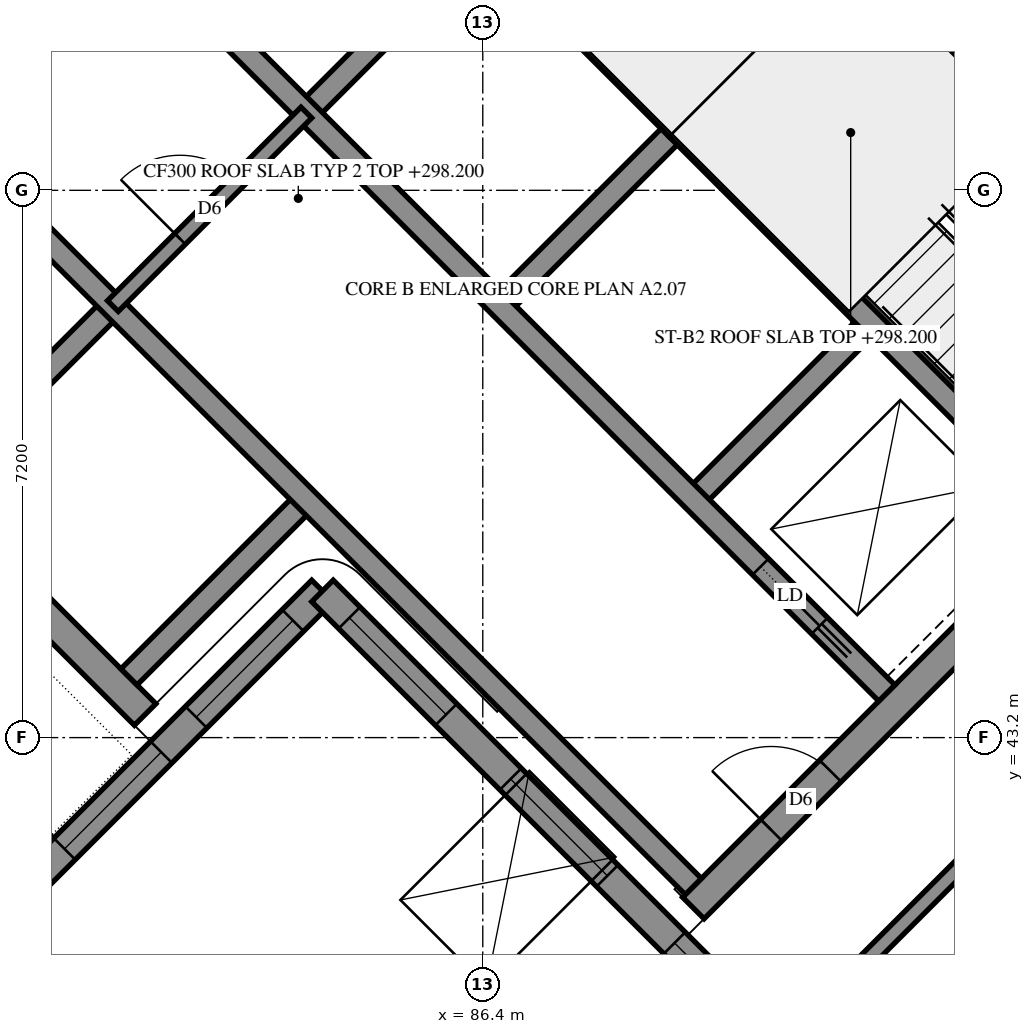
"""IFC4 building model, lengths in metres.
Left out: names, types, materials, properties, quantities, classifications, styles, units other than length and angle.
Written with IfcOpenShell. Run it as: python <this file> out.ifc"""

import sys

from ifc_helpers import new_model, si_unit, direction, frame, frame_2d, origin, place, context, subcontext, project, spatial, polyline, rectangle, outline, extrude, element, fill, save


model = new_model("IFC4")
c1 = context("Model", 3, precision=1e-05, world=origin(), true_north=direction((0.0, 1.0)))
c2 = subcontext(c1, "Body", "Model", "MODEL_VIEW")
j1 = project(units=[si_unit("LENGTHUNIT", "METRE"), si_unit("PLANEANGLEUNIT", "RADIAN")], contexts=[c1])
p1 = place(None, origin())
s1 = spatial("IfcSite", under=j1, at=p1, CompositionType="ELEMENT")
p2 = place(p1, origin())
s2 = spatial("IfcBuilding", under=s1, at=p2, CompositionType="ELEMENT")
p3 = place(p2, frame((0.0, 0.0, 298.2)))
s3 = spatial("IfcBuildingStorey", under=s2, at=p3, CompositionType="ELEMENT", Elevation=298.2)
p4 = place(p3, frame((76.23, 49.231, -0.3), z_axis=(0.0, 0.0, 1.0), x_axis=(0.7071006083, -0.707112954, 0.0)))
e1 = element("IfcWall", 1, at=p4, inside=s3, PredefinedType="SHEAR", context=c2, shape_type="SweptSolid", body=[
    extrude(outline(polyline([(0.0, 0.0), (8.1, 0.0), (8.1, 3.1), (0.0, 3.1), (0.0, 0.0)])), frame((0.0, 0.2, 0.0), z_axis=(0.0, -1.0, 0.0), x_axis=(1.0, 0.0, 0.0)), (0.0, 0.0, 1.0), 0.4),
])
p5 = place(p3, frame((86.695, 59.696, -0.3), z_axis=(0.0, 0.0, 1.0), x_axis=(0.7071100706, -0.7071034917, 0.0)))
e2 = element("IfcWall", 2, at=p5, inside=s3, PredefinedType="SHEAR", context=c2, shape_type="SweptSolid", body=[
    extrude(outline(polyline([(0.0, 0.0), (15.2, 0.0), (15.2, 3.1), (0.0, 3.1), (0.0, 0.0)])), frame((0.0, 0.2, 0.0), z_axis=(0.0, -1.0, 0.0), x_axis=(1.0, 0.0, 0.0)), (0.0, 0.0, 1.0), 0.4),
])
p6 = place(p5, frame((10.4, 0.0, 0.3)))
e3 = element("IfcOpeningElement", 3, at=p6, cuts=e2, PredefinedType="OPENING", context=c2, shape_type="SweptSolid", body=[
    extrude(rectangle(XDim=0.8, YDim=2.1, at=frame_2d((0.4, 1.05))), frame((0.0, 0.21, 0.0), z_axis=(0.0, -1.0, 0.0), x_axis=(1.0, 0.0, 0.0)), (0.0, 0.0, 1.0), 0.42),
])
p7 = place(p3, frame((76.513, 49.231, -0.3), z_axis=(0.0, 0.0, 1.0), x_axis=(0.7071067812, 0.7071067812, 0.0)))
e4 = element("IfcWall", 4, at=p7, inside=s3, PredefinedType="SHEAR", context=c2, shape_type="SweptSolid", body=[
    extrude(outline(polyline([(0.0, 0.0), (14.4, 0.0), (14.4, 3.1), (0.0, 3.1), (0.0, 0.0)])), frame((0.0, 0.2, 0.0), z_axis=(0.0, -1.0, 0.0), x_axis=(1.0, 0.0, 0.0)), (0.0, 0.0, 1.0), 0.4),
])
p8 = place(p7, frame((4.55, 0.0, 0.3)))
e5 = element("IfcOpeningElement", 5, at=p8, cuts=e4, PredefinedType="OPENING", context=c2, shape_type="SweptSolid", body=[
    extrude(rectangle(XDim=1.1, YDim=2.1, at=frame_2d((0.55, 1.05))), frame((0.0, 0.21, 0.0), z_axis=(0.0, -1.0, 0.0), x_axis=(1.0, 0.0, 0.0)), (0.0, 0.0, 1.0), 0.42),
])
p9 = place(p7, frame((11.35, 0.0, 0.3)))
e6 = element("IfcOpeningElement", 6, at=p9, cuts=e4, PredefinedType="OPENING", context=c2, shape_type="SweptSolid", body=[
    extrude(rectangle(XDim=1.1, YDim=2.1, at=frame_2d((0.55, 1.05))), frame((0.0, 0.21, 0.0), z_axis=(0.0, -1.0, 0.0), x_axis=(1.0, 0.0, 0.0)), (0.0, 0.0, 1.0), 0.42),
])
p10 = place(p3, frame((89.17, 40.958, -0.3), z_axis=(0.0, 0.0, 1.0), x_axis=(0.7071067812, 0.7071067812, 0.0)))
e7 = element("IfcWall", 7, at=p10, inside=s3, PredefinedType="SHEAR", context=c2, shape_type="SweptSolid", body=[
    extrude(outline(polyline([(0.0, 0.0), (11.3, 0.0), (11.3, 3.1), (0.0, 3.1), (0.0, 0.0)])), frame((0.0, 0.2, 0.0), z_axis=(0.0, -1.0, 0.0), x_axis=(1.0, 0.0, 0.0)), (0.0, 0.0, 1.0), 0.4),
])
p11 = place(p10, frame((1.45, 0.0, 0.3)))
e8 = element("IfcOpeningElement", 8, at=p11, cuts=e7, PredefinedType="OPENING", context=c2, shape_type="SweptSolid", body=[
    extrude(rectangle(XDim=1.1, YDim=2.1, at=frame_2d((0.55, 1.05))), frame((0.0, 0.21, 0.0), z_axis=(0.0, -1.0, 0.0), x_axis=(1.0, 0.0, 0.0)), (0.0, 0.0, 1.0), 0.42),
])
p12 = place(p10, frame((8.25, 0.0, 0.3)))
e9 = element("IfcOpeningElement", 9, at=p12, cuts=e7, PredefinedType="OPENING", context=c2, shape_type="SweptSolid", body=[
    extrude(rectangle(XDim=1.1, YDim=2.1, at=frame_2d((0.55, 1.05))), frame((0.0, 0.21, 0.0), z_axis=(0.0, -1.0, 0.0), x_axis=(1.0, 0.0, 0.0)), (0.0, 0.0, 1.0), 0.42),
])
for number, where, z_axis, x_axis in (
    (10, (79.2, 46.544, 0.0), (0.0, 0.0, 1.0), (0.707, 0.707, 0.0)),
    (11, (84.079, 51.423, 0.0), (0.0, 0.0, 1.0), (0.707, 0.707, 0.0)),
):
    element("IfcWall", number, at=place(p3, frame(where, z_axis=z_axis, x_axis=x_axis)), inside=s3, PredefinedType="SOLIDWALL", context=c2, shape_type="SweptSolid", body=[
        extrude(outline(polyline([(0.0, 0.0), (3.3, 0.0), (3.3, 3.5), (0.0, 3.5), (0.0, 0.0)])), frame((0.0, 0.15, 0.0), z_axis=(0.0, -1.0, 0.0), x_axis=(1.0, 0.0, 0.0)), (0.0, 0.0, 1.0), 0.3),
    ])
p13 = place(p3, frame((81.746, 43.999, 0.0), z_axis=(0.0, 0.0, 1.0), x_axis=(0.7071067812, 0.7071067812, 0.0)))
e12 = element("IfcWall", 12, at=p13, inside=s3, PredefinedType="SOLIDWALL", context=c2, shape_type="SweptSolid", body=[
    extrude(outline(polyline([(0.0, 0.0), (3.3, 0.0), (3.3, 3.5), (0.0, 3.5), (0.0, 0.0)])), frame((0.0, 0.15, 0.0), z_axis=(0.0, -1.0, 0.0), x_axis=(1.0, 0.0, 0.0)), (0.0, 0.0, 1.0), 0.3),
])
for number, where, z_axis, x_axis in (
    (13, (86.625, 48.878, 0.0), (0.0, 0.0, 1.0), (0.707, 0.707, 0.0)),
    (14, (89.17, 46.332, 0.0), (0.0, 0.0, 1.0), (0.707, 0.707, 0.0)),
):
    element("IfcWall", number, at=place(p3, frame(where, z_axis=z_axis, x_axis=x_axis)), inside=s3, PredefinedType="SOLIDWALL", context=c2, shape_type="SweptSolid", body=[
        extrude(outline(polyline([(0.0, 0.0), (3.3, 0.0), (3.3, 3.5), (0.0, 3.5), (0.0, 0.0)])), frame((0.0, 0.15, 0.0), z_axis=(0.0, -1.0, 0.0), x_axis=(1.0, 0.0, 0.0)), (0.0, 0.0, 1.0), 0.3),
    ])
p14 = place(p3, frame((78.988, 51.423, 0.0), z_axis=(0.0, 0.0, 1.0), x_axis=(0.7071067812, -0.7071067812, 0.0)))
e15 = element("IfcWall", 15, at=p14, inside=s3, PredefinedType="SOLIDWALL", context=c2, shape_type="SweptSolid", body=[
    extrude(outline(polyline([(0.0, 0.0), (14.4, 0.0), (14.4, 3.5), (0.0, 3.5), (0.0, 0.0)])), frame((0.0, 0.15, 0.0), z_axis=(0.0, -1.0, 0.0), x_axis=(1.0, 0.0, 0.0)), (0.0, 0.0, 1.0), 0.3),
])
p15 = place(p3, frame((81.534, 53.969, 0.0), z_axis=(0.0, 0.0, 1.0), x_axis=(0.707103309, -0.7071102534, 0.0)))
e16 = element("IfcWall", 16, at=p15, inside=s3, PredefinedType="SOLIDWALL", context=c2, shape_type="SweptSolid", body=[
    extrude(outline(polyline([(0.0, 0.0), (14.4, 0.0), (14.4, 3.5), (0.0, 3.5), (0.0, 0.0)])), frame((0.0, 0.15, 0.0), z_axis=(0.0, -1.0, 0.0), x_axis=(1.0, 0.0, 0.0)), (0.0, 0.0, 1.0), 0.3),
])
p16 = place(p15, frame((12.05, 0.0, 0.0)))
e17 = element("IfcOpeningElement", 17, at=p16, cuts=e16, PredefinedType="OPENING", context=c2, shape_type="SweptSolid", body=[
    extrude(rectangle(XDim=1.1, YDim=2.1, at=frame_2d((0.55, 1.05))), frame((0.0, 0.16, 0.0), z_axis=(0.0, -1.0, 0.0), x_axis=(1.0, 0.0, 0.0)), (0.0, 0.0, 1.0), 0.32),
])
for number, where, z_axis, x_axis in (
    (18, (83.867, 56.302, 0.0), (0.0, 0.0, 1.0), (0.707, -0.707, 0.0)),
    (19, (88.958, 51.211, 0.0), (0.0, 0.0, 1.0), (0.707, -0.707, 0.0)),
):
    element("IfcWall", number, at=place(p3, frame(where, z_axis=z_axis, x_axis=x_axis)), inside=s3, PredefinedType="SOLIDWALL", context=c2, shape_type="SweptSolid", body=[
        extrude(outline(polyline([(0.0, 0.0), (7.2, 0.0), (7.2, 3.5), (0.0, 3.5), (0.0, 0.0)])), frame((0.0, 0.15, 0.0), z_axis=(0.0, -1.0, 0.0), x_axis=(1.0, 0.0, 0.0)), (0.0, 0.0, 1.0), 0.3),
    ])
p17 = place(p3, frame((88.958, 51.211, 0.0), z_axis=(0.0, 0.0, 1.0), x_axis=(0.7071067812, 0.7071067812, 0.0)))
e20 = element("IfcWall", 20, at=p17, inside=s3, PredefinedType="SOLIDWALL", context=c2, shape_type="SweptSolid", body=[
    extrude(outline(polyline([(0.0, 0.0), (4.2, 0.0), (4.2, 3.5), (0.0, 3.5), (0.0, 0.0)])), frame((0.0, 0.15, 0.0), z_axis=(0.0, -1.0, 0.0), x_axis=(1.0, 0.0, 0.0)), (0.0, 0.0, 1.0), 0.3),
])
p18 = place(p3, frame((78.379, 39.217, 0.0), z_axis=(0.0, 0.0, 1.0), x_axis=(0.7071127608, 0.7071008016, 0.0)))
e21 = element("IfcWall", 21, at=p18, inside=s3, PredefinedType="SOLIDWALL", context=c2, shape_type="SweptSolid", body=[
    extrude(outline(polyline([(-0.268, -0.2), (8.162, -0.2), (8.162, 0.2), (0.268, 0.2), (-0.268, -0.2)])), origin(), (0.0, 0.0, 1.0), 3.5),
])
p19 = place(p18, frame((3.562, 0.0, 0.7)))
e22 = element("IfcOpeningElement", 22, at=p19, cuts=e21, PredefinedType="OPENING", context=c2, shape_type="SweptSolid", body=[
    extrude(rectangle(XDim=1.8, YDim=2.2, at=frame_2d((0.9, 1.1))), frame((0.0, 0.21, 0.0), z_axis=(0.0, -1.0, 0.0), x_axis=(1.0, 0.0, 0.0)), (0.0, 0.0, 1.0), 0.42),
])
p20 = place(p18, frame((6.012, 0.0, 0.7)))
e23 = element("IfcOpeningElement", 23, at=p20, cuts=e21, PredefinedType="OPENING", context=c2, shape_type="SweptSolid", body=[
    extrude(rectangle(XDim=1.8, YDim=2.2, at=frame_2d((0.9, 1.1))), frame((0.0, 0.21, 0.0), z_axis=(0.0, -1.0, 0.0), x_axis=(1.0, 0.0, 0.0)), (0.0, 0.0, 1.0), 0.42),
])
p21 = place(p3, frame((84.291, 45.13, 0.0), z_axis=(0.0, 0.0, 1.0), x_axis=(0.7071067812, -0.7071067812, 0.0)))
e24 = element("IfcWall", 24, at=p21, inside=s3, PredefinedType="SOLIDWALL", context=c2, shape_type="SweptSolid", body=[
    extrude(outline(polyline([(-0.2, -0.2), (14.6, -0.2), (14.2, 0.2), (-0.2, 0.2), (-0.2, -0.2)])), origin(), (0.0, 0.0, 1.0), 3.5),
])
p22 = place(p21, frame((0.5, 0.0, 0.7)))
e25 = element("IfcOpeningElement", 25, at=p22, cuts=e24, PredefinedType="OPENING", context=c2, shape_type="SweptSolid", body=[
    extrude(rectangle(XDim=1.8, YDim=2.2, at=frame_2d((0.9, 1.1))), frame((0.0, 0.21, 0.0), z_axis=(0.0, -1.0, 0.0), x_axis=(1.0, 0.0, 0.0)), (0.0, 0.0, 1.0), 0.42),
])
p23 = place(p21, frame((3.5, 0.0, 0.7)))
e26 = element("IfcOpeningElement", 26, at=p23, cuts=e24, PredefinedType="OPENING", context=c2, shape_type="SweptSolid", body=[
    extrude(rectangle(XDim=1.8, YDim=2.2, at=frame_2d((0.9, 1.1))), frame((0.0, 0.21, 0.0), z_axis=(0.0, -1.0, 0.0), x_axis=(1.0, 0.0, 0.0)), (0.0, 0.0, 1.0), 0.42),
])
p24 = place(p21, frame((6.55, 0.0, 0.7)))
e27 = element("IfcOpeningElement", 27, at=p24, cuts=e24, PredefinedType="OPENING", context=c2, shape_type="SweptSolid", body=[
    extrude(rectangle(XDim=1.8, YDim=2.2, at=frame_2d((0.9, 1.1))), frame((0.0, 0.21, 0.0), z_axis=(0.0, -1.0, 0.0), x_axis=(1.0, 0.0, 0.0)), (0.0, 0.0, 1.0), 0.42),
])
p25 = place(p21, frame((10.7, 0.0, 0.7)))
e28 = element("IfcOpeningElement", 28, at=p25, cuts=e24, PredefinedType="OPENING", context=c2, shape_type="SweptSolid", body=[
    extrude(rectangle(XDim=1.8, YDim=2.2, at=frame_2d((0.9, 1.1))), frame((0.0, 0.21, 0.0), z_axis=(0.0, -1.0, 0.0), x_axis=(1.0, 0.0, 0.0)), (0.0, 0.0, 1.0), 0.42),
])
p26 = place(p3, frame((91.313, 53.354, 0.0), z_axis=(0.0, 0.0, 1.0), x_axis=(0.7071140275, -0.7070995348, 0.0)))
e29 = element("IfcWall", 29, at=p26, inside=s3, PredefinedType="PARTITIONING", context=c2, shape_type="SweptSolid", body=[
    extrude(outline(polyline([(0.0, 0.0), (6.9, 0.0), (6.9, 3.5), (0.0, 3.5), (0.0, 0.0)])), frame((0.0, 0.075, 0.0), z_axis=(0.0, -1.0, 0.0), x_axis=(1.0, 0.0, 0.0)), (0.0, 0.0, 1.0), 0.15),
])
p27 = place(p3, frame((81.534, 48.878, 0.0), z_axis=(0.0, 0.0, 1.0), x_axis=(0.707092892, 0.7071206701, 0.0)))
e30 = element("IfcWall", 30, at=p27, inside=s3, PredefinedType="PARTITIONING", context=c2, shape_type="SweptSolid", body=[
    extrude(outline(polyline([(0.0, 0.0), (3.6, 0.0), (3.6, 3.5), (0.0, 3.5), (0.0, 0.0)])), frame((0.0, 0.1, 0.0), z_axis=(0.0, -1.0, 0.0), x_axis=(1.0, 0.0, 0.0)), (0.0, 0.0, 1.0), 0.2),
])
p28 = place(p27, frame((1.25, 0.0, 0.0)))
e31 = element("IfcOpeningElement", 31, at=p28, cuts=e30, PredefinedType="OPENING", context=c2, shape_type="SweptSolid", body=[
    extrude(rectangle(XDim=1.1, YDim=2.1, at=frame_2d((0.55, 1.05))), frame((0.0, 0.11, 0.0), z_axis=(0.0, -1.0, 0.0), x_axis=(1.0, 0.0, 0.0)), (0.0, 0.0, 1.0), 0.22),
])
p29 = place(p3, frame((100.269, 49.087, 0.0), z_axis=(0.0, 0.0, 1.0), x_axis=(-0.7071525817, 0.7070609777, 0.0)))
e32 = element("IfcWall", 32, at=p29, inside=s3, PredefinedType="PARTITIONING", context=c2, shape_type="SweptSolid", body=[
    extrude(rectangle(XDim=13.1, YDim=0.2, at=frame_2d((6.55, 0.0))), origin(), (0.0, 0.0, 1.0), 3.5),
])
p30 = place(p29, frame((10.029, 0.0, 0.0)))
e33 = element("IfcOpeningElement", 33, at=p30, cuts=e32, PredefinedType="OPENING", context=c2, shape_type="SweptSolid", body=[
    extrude(rectangle(XDim=1.0, YDim=2.1, at=frame_2d((0.5, 1.05))), frame((0.0, 0.11, 0.0), z_axis=(0.0, -1.0, 0.0), x_axis=(1.0, 0.0, 0.0)), (0.0, 0.0, 1.0), 0.22),
])
p31 = place(p3, frame((74.388, 48.096, 0.0), z_axis=(0.0, 0.0, 1.0), x_axis=(0.7071067812, -0.7071067812, 0.0)))
e34 = element("IfcWall", 34, at=p31, inside=s3, PredefinedType="PARTITIONING", context=c2, shape_type="SweptSolid", body=[
    extrude(rectangle(XDim=8.9, YDim=0.2, at=frame_2d((4.45, 0.0))), origin(), (0.0, 0.0, 1.0), 3.5),
])
p32 = place(p31, frame((2.564, 0.0, 0.0)))
e35 = element("IfcOpeningElement", 35, at=p32, cuts=e34, PredefinedType="OPENING", context=c2, shape_type="SweptSolid", body=[
    extrude(rectangle(XDim=1.0, YDim=2.1, at=frame_2d((0.5, 1.05))), frame((0.0, 0.11, 0.0), z_axis=(0.0, -1.0, 0.0), x_axis=(1.0, 0.0, 0.0)), (0.0, 0.0, 1.0), 0.22),
])
p33 = place(p3, frame((90.442, 39.262, 0.0), z_axis=(0.0, 0.0, 1.0), x_axis=(0.7071067812, 0.7071067812, 0.0)))
e36 = element("IfcWall", 36, at=p33, inside=s3, PredefinedType="PARTITIONING", context=c2, shape_type="SweptSolid", body=[
    extrude(rectangle(XDim=3.449, YDim=0.2, at=frame_2d((1.725, 0.0))), origin(), (0.0, 0.0, 1.0), 3.5),
])
p34 = place(p19, origin())
e37 = element("IfcWindow", 37, at=p34, inside=s3, PartitioningType="SINGLE_PANEL", PredefinedType="WINDOW", context=c2, shape_type="SweptSolid", body=[
    extrude(rectangle(XDim=1.8, YDim=2.2, at=frame_2d((0.9, 1.1))), frame((0.0, 0.08, 0.0), z_axis=(0.0, -1.0, 0.0), x_axis=(1.0, 0.0, 0.0)), (0.0, 0.0, 1.0), 0.06),
])
fill(e22, e37)
p35 = place(p20, origin())
e38 = element("IfcWindow", 38, at=p35, inside=s3, PartitioningType="SINGLE_PANEL", PredefinedType="WINDOW", context=c2, shape_type="SweptSolid", body=[
    extrude(rectangle(XDim=1.8, YDim=2.2, at=frame_2d((0.9, 1.1))), frame((0.0, 0.08, 0.0), z_axis=(0.0, -1.0, 0.0), x_axis=(1.0, 0.0, 0.0)), (0.0, 0.0, 1.0), 0.06),
])
fill(e23, e38)
p36 = place(p22, origin())
e39 = element("IfcWindow", 39, at=p36, inside=s3, PartitioningType="SINGLE_PANEL", PredefinedType="WINDOW", context=c2, shape_type="SweptSolid", body=[
    extrude(rectangle(XDim=1.8, YDim=2.2, at=frame_2d((0.9, 1.1))), frame((0.0, 0.08, 0.0), z_axis=(0.0, -1.0, 0.0), x_axis=(1.0, 0.0, 0.0)), (0.0, 0.0, 1.0), 0.06),
])
fill(e25, e39)
p37 = place(p23, origin())
e40 = element("IfcWindow", 40, at=p37, inside=s3, PartitioningType="SINGLE_PANEL", PredefinedType="WINDOW", context=c2, shape_type="SweptSolid", body=[
    extrude(rectangle(XDim=1.8, YDim=2.2, at=frame_2d((0.9, 1.1))), frame((0.0, 0.08, 0.0), z_axis=(0.0, -1.0, 0.0), x_axis=(1.0, 0.0, 0.0)), (0.0, 0.0, 1.0), 0.06),
])
fill(e26, e40)
p38 = place(p24, origin())
e41 = element("IfcWindow", 41, at=p38, inside=s3, PartitioningType="SINGLE_PANEL", PredefinedType="WINDOW", context=c2, shape_type="SweptSolid", body=[
    extrude(rectangle(XDim=1.8, YDim=2.2, at=frame_2d((0.9, 1.1))), frame((0.0, 0.08, 0.0), z_axis=(0.0, -1.0, 0.0), x_axis=(1.0, 0.0, 0.0)), (0.0, 0.0, 1.0), 0.06),
])
fill(e27, e41)
p39 = place(p11, origin())
e42 = element("IfcDoor", 42, at=p39, inside=s3, OperationType="DOUBLE_DOOR_SINGLE_SWING", PredefinedType="DOOR", context=c2, shape_type="SweptSolid", body=[
    extrude(rectangle(XDim=1.1, YDim=2.1, at=frame_2d((0.55, 1.05))), frame((0.0, 0.025, 0.0), z_axis=(0.0, -1.0, 0.0), x_axis=(1.0, 0.0, 0.0)), (0.0, 0.0, 1.0), 0.05),
])
fill(e8, e42)
p40 = place(p28, origin())
e43 = element("IfcDoor", 43, at=p40, inside=s3, OperationType="DOUBLE_DOOR_SINGLE_SWING", PredefinedType="DOOR", context=c2, shape_type="SweptSolid", body=[
    extrude(rectangle(XDim=1.1, YDim=2.1, at=frame_2d((0.55, 1.05))), frame((0.0, 0.025, 0.0), z_axis=(0.0, -1.0, 0.0), x_axis=(1.0, 0.0, 0.0)), (0.0, 0.0, 1.0), 0.05),
])
fill(e31, e43)
p41 = place(p16, origin())
e44 = element("IfcDoor", 44, at=p41, inside=s3, OperationType="SLIDING_TO_RIGHT", PredefinedType="DOOR", context=c2, shape_type="SweptSolid", body=[
    extrude(rectangle(XDim=1.1, YDim=2.1, at=frame_2d((0.55, 1.05))), frame((0.0, 0.025, 0.0), z_axis=(0.0, -1.0, 0.0), x_axis=(1.0, 0.0, 0.0)), (0.0, 0.0, 1.0), 0.05),
])
fill(e17, e44)
save(model, sys.argv[1])
